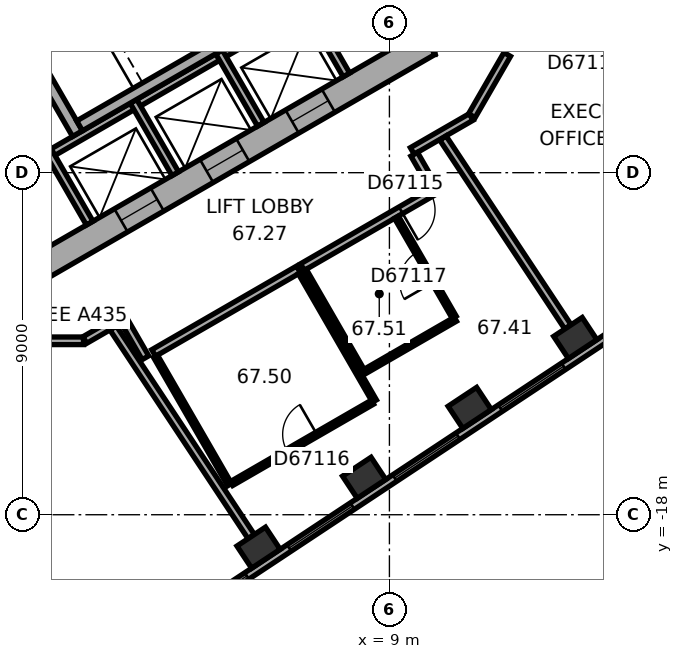
"""IFC4 building model, lengths in metres.
Left out: names, types, materials, properties, quantities, classifications, styles, units other than length and angle.
Written with IfcOpenShell. Run it as: python <this file> out.ifc"""

import sys

from ifc_helpers import new_model, si_unit, direction, frame, frame_2d, origin, origin_2d, place, context, subcontext, project, spatial, rectangle, extrude, element, fill, save


model = new_model("IFC4")
c1 = context("Model", 3, precision=1e-05, world=origin(), true_north=direction((0.0, 1.0)))
c2 = subcontext(c1, "Body", "Model", "MODEL_VIEW")
j1 = project(units=[si_unit("LENGTHUNIT", "METRE"), si_unit("PLANEANGLEUNIT", "RADIAN")], contexts=[c1])
p1 = place(None, origin())
s1 = spatial("IfcSite", under=j1, at=p1, CompositionType="ELEMENT")
p2 = place(p1, origin())
s2 = spatial("IfcBuilding", under=s1, at=p2, CompositionType="ELEMENT")
p3 = place(p2, frame((0.0, 0.0, 270.9)))
s3 = spatial("IfcBuildingStorey", under=s2, at=p3, CompositionType="ELEMENT", Elevation=270.9)
for number, where, z_axis, x_axis in (
    (1, (5.557, -18.867, 0.0), (0.0, 0.0, 1.0), (0.834, 0.552, 0.0)),
    (2, (8.335, -17.028, 0.0), (0.0, 0.0, 1.0), (0.834, 0.552, 0.0)),
    (3, (11.113, -15.189, 0.0), (0.0, 0.0, 1.0), (0.834, 0.552, 0.0)),
    (4, (13.891, -13.351, 0.0), (0.0, 0.0, 1.0), (0.834, 0.552, 0.0)),
):
    element("IfcColumn", number, at=place(p3, frame(where, z_axis=z_axis, x_axis=x_axis)), inside=s3, PredefinedType="COLUMN", context=c2, shape_type="SweptSolid", body=[
        extrude(rectangle(XDim=0.9, YDim=0.7, at=origin_2d()), origin(), (0.0, 0.0, 1.0), 3.7),
    ])
p4 = place(p3, frame((9.85, -5.889, 0.0), z_axis=(0.0, 0.0, 1.0), x_axis=(0.0, 1.0, 0.0)))
e5 = element("IfcWall", 5, at=p4, inside=s3, PredefinedType="SHEAR", context=c2, shape_type="SweptSolid", body=[
    extrude(rectangle(XDim=11.778, YDim=0.7, at=frame_2d((5.889, 0.0))), origin(), (0.0, 0.0, 1.0), 3.7),
])
p5 = place(p4, frame((6.089, 0.0, 0.0)))
e6 = element("IfcOpeningElement", 6, at=p5, cuts=e5, PredefinedType="OPENING", context=c2, shape_type="SweptSolid", body=[
    extrude(rectangle(XDim=1.5, YDim=2.1, at=frame_2d((0.75, 1.05))), frame((0.0, 0.36, 0.0), z_axis=(0.0, -1.0, 0.0), x_axis=(1.0, 0.0, 0.0)), (0.0, 0.0, 1.0), 0.72),
])
p6 = place(p4, frame((1.639, 0.0, 0.0)))
e7 = element("IfcOpeningElement", 7, at=p6, cuts=e5, PredefinedType="OPENING", context=c2, shape_type="SweptSolid", body=[
    extrude(rectangle(XDim=0.9, YDim=2.1, at=frame_2d((0.45, 1.05))), frame((0.0, 0.36, 0.0), z_axis=(0.0, -1.0, 0.0), x_axis=(1.0, 0.0, 0.0)), (0.0, 0.0, 1.0), 0.72),
])
p7 = place(p4, frame((4.239, 0.0, 0.0)))
e8 = element("IfcOpeningElement", 8, at=p7, cuts=e5, PredefinedType="OPENING", context=c2, shape_type="SweptSolid", body=[
    extrude(rectangle(XDim=0.9, YDim=2.1, at=frame_2d((0.45, 1.05))), frame((0.0, 0.36, 0.0), z_axis=(0.0, -1.0, 0.0), x_axis=(1.0, 0.0, 0.0)), (0.0, 0.0, 1.0), 0.72),
])
p8 = place(p3, frame((-10.025, -5.586, 0.0), z_axis=(0.0, 0.0, 1.0), x_axis=(0.866026453023, -0.499998182661, 0.0)))
e9 = element("IfcWall", 9, at=p8, inside=s3, PredefinedType="SHEAR", context=c2, shape_type="SweptSolid", body=[
    extrude(rectangle(XDim=11.778, YDim=0.7, at=frame_2d((5.889, 0.0))), origin(), (0.0, 0.0, 1.0), 3.7),
])
p9 = place(p8, frame((6.089, 0.0, 0.0)))
e10 = element("IfcOpeningElement", 10, at=p9, cuts=e9, PredefinedType="OPENING", context=c2, shape_type="SweptSolid", body=[
    extrude(rectangle(XDim=1.5, YDim=2.1, at=frame_2d((0.75, 1.05))), frame((0.0, 0.36, 0.0), z_axis=(0.0, -1.0, 0.0), x_axis=(1.0, 0.0, 0.0)), (0.0, 0.0, 1.0), 0.72),
])
p10 = place(p8, frame((1.539, 0.0, 0.0)))
e11 = element("IfcOpeningElement", 11, at=p10, cuts=e9, PredefinedType="OPENING", context=c2, shape_type="SweptSolid", body=[
    extrude(rectangle(XDim=1.1, YDim=2.1, at=frame_2d((0.55, 1.05))), frame((0.0, 0.36, 0.0), z_axis=(0.0, -1.0, 0.0), x_axis=(1.0, 0.0, 0.0)), (0.0, 0.0, 1.0), 0.72),
])
p11 = place(p8, frame((4.139, 0.0, 0.0)))
e12 = element("IfcOpeningElement", 12, at=p11, cuts=e9, PredefinedType="OPENING", context=c2, shape_type="SweptSolid", body=[
    extrude(rectangle(XDim=1.1, YDim=2.1, at=frame_2d((0.55, 1.05))), frame((0.0, 0.36, 0.0), z_axis=(0.0, -1.0, 0.0), x_axis=(1.0, 0.0, 0.0)), (0.0, 0.0, 1.0), 0.72),
])
p12 = place(p3, frame((-0.175, -11.475, 0.0), z_axis=(0.0, 0.0, 1.0), x_axis=(0.866026453023, 0.499998182661, 0.0)))
e13 = element("IfcWall", 13, at=p12, inside=s3, PredefinedType="SHEAR", context=c2, shape_type="SweptSolid", body=[
    extrude(rectangle(XDim=11.778, YDim=0.7, at=frame_2d((5.889, 0.0))), origin(), (0.0, 0.0, 1.0), 3.7),
])
p13 = place(p12, frame((2.439, 0.0, 0.0)))
e14 = element("IfcOpeningElement", 14, at=p13, cuts=e13, PredefinedType="OPENING", context=c2, shape_type="SweptSolid", body=[
    extrude(rectangle(XDim=1.1, YDim=2.1, at=frame_2d((0.55, 1.05))), frame((0.0, 0.36, 0.0), z_axis=(0.0, -1.0, 0.0), x_axis=(1.0, 0.0, 0.0)), (0.0, 0.0, 1.0), 0.72),
])
p14 = place(p12, frame((5.039, 0.0, 0.0)))
e15 = element("IfcOpeningElement", 15, at=p14, cuts=e13, PredefinedType="OPENING", context=c2, shape_type="SweptSolid", body=[
    extrude(rectangle(XDim=1.1, YDim=2.1, at=frame_2d((0.55, 1.05))), frame((0.0, 0.36, 0.0), z_axis=(0.0, -1.0, 0.0), x_axis=(1.0, 0.0, 0.0)), (0.0, 0.0, 1.0), 0.72),
])
p15 = place(p12, frame((7.639, 0.0, 0.0)))
e16 = element("IfcOpeningElement", 16, at=p15, cuts=e13, PredefinedType="OPENING", context=c2, shape_type="SweptSolid", body=[
    extrude(rectangle(XDim=1.1, YDim=2.1, at=frame_2d((0.55, 1.05))), frame((0.0, 0.36, 0.0), z_axis=(0.0, -1.0, 0.0), x_axis=(1.0, 0.0, 0.0)), (0.0, 0.0, 1.0), 0.72),
])
p16 = place(p3, frame((2.58, -21.377, 0.0), z_axis=(0.0, 0.0, 1.0), x_axis=(0.833888592176, 0.551932800112, 0.0)))
e17 = element("IfcWall", 17, at=p16, inside=s3, PredefinedType="STANDARD", context=c2, shape_type="SweptSolid", body=[
    extrude(rectangle(XDim=17.731, YDim=0.2, at=frame_2d((8.866, 0.0))), origin(), (0.0, 0.0, 1.0), 3.7),
])
p17 = place(p16, frame((1.202, 0.0, 0.9)))
e18 = element("IfcOpeningElement", 18, at=p17, cuts=e17, PredefinedType="OPENING", context=c2, shape_type="SweptSolid", body=[
    extrude(rectangle(XDim=2.0, YDim=2.0, at=frame_2d((1.0, 1.0))), frame((0.0, 0.11, 0.0), z_axis=(0.0, -1.0, 0.0), x_axis=(1.0, 0.0, 0.0)), (0.0, 0.0, 1.0), 0.22),
])
p18 = place(p16, frame((4.533, 0.0, 0.9)))
e19 = element("IfcOpeningElement", 19, at=p18, cuts=e17, PredefinedType="OPENING", context=c2, shape_type="SweptSolid", body=[
    extrude(rectangle(XDim=2.0, YDim=2.0, at=frame_2d((1.0, 1.0))), frame((0.0, 0.11, 0.0), z_axis=(0.0, -1.0, 0.0), x_axis=(1.0, 0.0, 0.0)), (0.0, 0.0, 1.0), 0.22),
])
p19 = place(p16, frame((7.865, 0.0, 0.9)))
e20 = element("IfcOpeningElement", 20, at=p19, cuts=e17, PredefinedType="OPENING", context=c2, shape_type="SweptSolid", body=[
    extrude(rectangle(XDim=2.0, YDim=2.0, at=frame_2d((1.0, 1.0))), frame((0.0, 0.11, 0.0), z_axis=(0.0, -1.0, 0.0), x_axis=(1.0, 0.0, 0.0)), (0.0, 0.0, 1.0), 0.22),
])
p20 = place(p16, frame((11.197, 0.0, 0.9)))
e21 = element("IfcOpeningElement", 21, at=p20, cuts=e17, PredefinedType="OPENING", context=c2, shape_type="SweptSolid", body=[
    extrude(rectangle(XDim=2.0, YDim=2.0, at=frame_2d((1.0, 1.0))), frame((0.0, 0.11, 0.0), z_axis=(0.0, -1.0, 0.0), x_axis=(1.0, 0.0, 0.0)), (0.0, 0.0, 1.0), 0.22),
])
p21 = place(p16, frame((14.528, 0.0, 0.9)))
e22 = element("IfcOpeningElement", 22, at=p21, cuts=e17, PredefinedType="OPENING", context=c2, shape_type="SweptSolid", body=[
    extrude(rectangle(XDim=2.0, YDim=2.0, at=frame_2d((1.0, 1.0))), frame((0.0, 0.11, 0.0), z_axis=(0.0, -1.0, 0.0), x_axis=(1.0, 0.0, 0.0)), (0.0, 0.0, 1.0), 0.22),
])
p22 = place(p3, frame((-0.024, -8.559, 0.0), z_axis=(0.0, 0.0, 1.0), x_axis=(0.866026010844, 0.49999894854, 0.0)))
e23 = element("IfcWall", 23, at=p22, inside=s3, PredefinedType="PARTITIONING", context=c2, shape_type="SweptSolid", body=[
    extrude(rectangle(XDim=8.0, YDim=0.2, at=frame_2d((4.0, 0.0))), origin(), (0.0, 0.0, 1.0), 3.42),
])
for number, where, z_axis, x_axis in (
    (24, (0.013, -8.422, 0.0), (0.0, 0.0, 1.0), (0.5, -0.866, 0.0)),
    (25, (2.264, -7.122, 0.0), (0.0, 0.0, 1.0), (0.5, -0.866, 0.0)),
    (26, (4.516, -5.822, 0.0), (0.0, 0.0, 1.0), (0.5, -0.866, 0.0)),
    (27, (6.768, -4.522, 0.0), (0.0, 0.0, 1.0), (0.5, -0.866, 0.0)),
):
    element("IfcWall", number, at=place(p3, frame(where, z_axis=z_axis, x_axis=x_axis)), inside=s3, PredefinedType="PARTITIONING", context=c2, shape_type="SweptSolid", body=[
        extrude(rectangle(XDim=2.2, YDim=0.2, at=frame_2d((1.1, 0.0))), origin(), (0.0, 0.0, 1.0), 3.42),
    ])
p23 = place(p3, frame((-1.558, -3.902, 0.0), z_axis=(0.0, 0.0, 1.0), x_axis=(0.499977259774, -0.866038532462, 0.0)))
e28 = element("IfcWall", 28, at=p23, inside=s3, PredefinedType="SHEAR", context=c2, shape_type="SweptSolid", body=[
    extrude(rectangle(XDim=4.7, YDim=0.3, at=frame_2d((2.35, 0.0))), origin(), (0.0, 0.0, 1.0), 3.42),
])
p24 = place(p23, frame((0.8, 0.0, 0.0)))
e29 = element("IfcOpeningElement", 29, at=p24, cuts=e28, PredefinedType="OPENING", context=c2, shape_type="SweptSolid", body=[
    extrude(rectangle(XDim=1.2, YDim=2.1, at=frame_2d((0.6, 1.05))), frame((0.0, 0.16, 0.0), z_axis=(0.0, -1.0, 0.0), x_axis=(1.0, 0.0, 0.0)), (0.0, 0.0, 1.0), 0.32),
])
p25 = place(p3, frame((0.847, -7.767, 0.0), z_axis=(0.0, 0.0, 1.0), x_axis=(0.866027801685, 0.499995846692, 0.0)))
e30 = element("IfcWall", 30, at=p25, inside=s3, PredefinedType="SHEAR", context=c2, shape_type="SweptSolid", body=[
    extrude(rectangle(XDim=7.06, YDim=0.3, at=frame_2d((3.53, 0.0))), origin(), (0.0, 0.0, 1.0), 3.42),
])
p26 = place(p3, frame((-0.91, -13.423, 0.0), z_axis=(0.0, 0.0, 1.0), x_axis=(1.0, 0.0, 0.0)))
e31 = element("IfcWall", 31, at=p26, inside=s3, PredefinedType="PARTITIONING", context=c2, shape_type="SweptSolid", body=[
    extrude(rectangle(XDim=1.86, YDim=0.2, at=frame_2d((0.93, 0.0))), origin(), (0.0, 0.0, 1.0), 3.42),
])
p27 = place(p3, frame((0.985, -13.403, 0.0), z_axis=(0.0, 0.0, 1.0), x_axis=(0.866032814021, 0.499987164874, 0.0)))
e32 = element("IfcWall", 32, at=p27, inside=s3, PredefinedType="PARTITIONING", context=c2, shape_type="SweptSolid", body=[
    extrude(rectangle(XDim=0.798, YDim=0.2, at=frame_2d((0.399, 0.0))), origin(), (0.0, 0.0, 1.0), 3.42),
])
p28 = place(p3, frame((1.979, -12.829, 0.0), z_axis=(0.0, 0.0, 1.0), x_axis=(0.500074377092, -0.865982457891, 0.0)))
e33 = element("IfcWall", 33, at=p28, inside=s3, PredefinedType="PARTITIONING", context=c2, shape_type="SweptSolid", body=[
    extrude(rectangle(XDim=1.201, YDim=0.2, at=frame_2d((0.601, 0.0))), origin(), (0.0, 0.0, 1.0), 3.42),
])
p29 = place(p3, frame((2.796, -13.744, 0.0), z_axis=(0.0, 0.0, 1.0), x_axis=(0.866018331238, 0.50001224981, 0.0)))
e34 = element("IfcWall", 34, at=p29, inside=s3, PredefinedType="PARTITIONING", context=c2, shape_type="SweptSolid", body=[
    extrude(rectangle(XDim=4.4, YDim=0.2, at=frame_2d((2.2, 0.0))), origin(), (0.0, 0.0, 1.0), 3.42),
])
p30 = place(p3, frame((4.796, -17.208, 0.0), z_axis=(0.0, 0.0, 1.0), x_axis=(-0.500043961785, 0.866000020948, 0.0)))
e35 = element("IfcWall", 35, at=p30, inside=s3, PredefinedType="PARTITIONING", context=c2, shape_type="SweptSolid", body=[
    extrude(rectangle(XDim=3.9, YDim=0.12, at=frame_2d((1.95, 0.0))), origin(), (0.0, 0.0, 1.0), 3.42),
])
p31 = place(p3, frame((5.364, -18.575, 0.0), z_axis=(0.0, 0.0, 1.0), x_axis=(-0.55195757761, 0.833872191957, 0.0)))
e36 = element("IfcWall", 36, at=p31, inside=s3, PredefinedType="PARTITIONING", context=c2, shape_type="SweptSolid", body=[
    extrude(rectangle(XDim=6.581, YDim=0.2, at=frame_2d((3.291, 0.0))), origin(), (0.0, 0.0, 1.0), 3.42),
])
p32 = place(p3, frame((6.656, -11.631, 0.0), z_axis=(0.0, 0.0, 1.0), x_axis=(0.499997012787, -0.866027128446, 0.0)))
e37 = element("IfcWall", 37, at=p32, inside=s3, PredefinedType="PARTITIONING", context=c2, shape_type="SweptSolid", body=[
    extrude(rectangle(XDim=3.9, YDim=0.12, at=frame_2d((1.95, 0.0))), origin(), (0.0, 0.0, 1.0), 3.42),
])
p33 = place(p3, frame((6.71, -11.485, 0.0), z_axis=(0.0, 0.0, 1.0), x_axis=(0.866021232452, 0.500007224889, 0.0)))
e38 = element("IfcWall", 38, at=p33, inside=s3, PredefinedType="PARTITIONING", context=c2, shape_type="SweptSolid", body=[
    extrude(rectangle(XDim=4.032, YDim=0.2, at=frame_2d((2.016, 0.0))), origin(), (0.0, 0.0, 1.0), 3.42),
])
p34 = place(p33, frame((2.991, 0.0, 0.0)))
e39 = element("IfcOpeningElement", 39, at=p34, cuts=e38, PredefinedType="OPENING", context=c2, shape_type="SweptSolid", body=[
    extrude(rectangle(XDim=0.9, YDim=2.1, at=frame_2d((0.45, 1.05))), frame((0.0, 0.11, 0.0), z_axis=(0.0, -1.0, 0.0), x_axis=(1.0, 0.0, 0.0)), (0.0, 0.0, 1.0), 0.22),
])
p35 = place(p3, frame((8.31, -14.256, 0.0), z_axis=(0.0, 0.0, 1.0), x_axis=(-0.49999285859, 0.86602952684, 0.0)))
e40 = element("IfcWall", 40, at=p35, inside=s3, PredefinedType="PARTITIONING", context=c2, shape_type="SweptSolid", body=[
    extrude(rectangle(XDim=3.1, YDim=0.12, at=frame_2d((1.55, 0.0))), origin(), (0.0, 0.0, 1.0), 3.42),
])
p36 = place(p3, frame((8.554, -15.039, 0.0), z_axis=(0.0, 0.0, 1.0), x_axis=(-0.865994635417, -0.500053288589, 0.0)))
e41 = element("IfcWall", 41, at=p36, inside=s3, PredefinedType="PARTITIONING", context=c2, shape_type="SweptSolid", body=[
    extrude(rectangle(XDim=4.28, YDim=0.12, at=frame_2d((2.14, 0.0))), origin(), (0.0, 0.0, 1.0), 3.42),
])
p37 = place(p36, frame((1.69, 0.0, 0.0)))
e42 = element("IfcOpeningElement", 42, at=p37, cuts=e41, PredefinedType="OPENING", context=c2, shape_type="SweptSolid", body=[
    extrude(rectangle(XDim=0.9, YDim=2.1, at=frame_2d((0.45, 1.05))), frame((0.0, 0.07, 0.0), z_axis=(0.0, -1.0, 0.0), x_axis=(1.0, 0.0, 0.0)), (0.0, 0.0, 1.0), 0.14),
])
p38 = place(p3, frame((9.602, -8.428, 0.0), z_axis=(0.0, 0.0, 1.0), x_axis=(0.865999114786, 0.500045531117, 0.0)))
e43 = element("IfcWall", 43, at=p38, inside=s3, PredefinedType="PARTITIONING", context=c2, shape_type="SweptSolid", body=[
    extrude(rectangle(XDim=1.788, YDim=0.2, at=frame_2d((0.894, 0.0))), origin(), (0.0, 0.0, 1.0), 3.42),
])
p39 = place(p3, frame((10.152, -9.382, 0.0), z_axis=(0.0, 0.0, 1.0), x_axis=(-0.499968756647, 0.866043441391, 0.0)))
e44 = element("IfcWall", 44, at=p39, inside=s3, PredefinedType="PARTITIONING", context=c2, shape_type="SweptSolid", body=[
    extrude(rectangle(XDim=1.001, YDim=0.2, at=frame_2d((0.5, 0.0))), origin(), (0.0, 0.0, 1.0), 3.42),
])
p40 = place(p3, frame((10.705, -12.804, 0.0), z_axis=(0.0, 0.0, 1.0), x_axis=(-0.500026023896, 0.86601037836, 0.0)))
e45 = element("IfcWall", 45, at=p40, inside=s3, PredefinedType="PARTITIONING", context=c2, shape_type="SweptSolid", body=[
    extrude(rectangle(XDim=3.04, YDim=0.12, at=frame_2d((1.52, 0.0))), origin(), (0.0, 0.0, 1.0), 3.42),
])
p41 = place(p40, frame((1.07, 0.0, 0.0)))
e46 = element("IfcOpeningElement", 46, at=p41, cuts=e45, PredefinedType="OPENING", context=c2, shape_type="SweptSolid", body=[
    extrude(rectangle(XDim=0.9, YDim=2.1, at=frame_2d((0.45, 1.05))), frame((0.0, 0.07, 0.0), z_axis=(0.0, -1.0, 0.0), x_axis=(1.0, 0.0, 0.0)), (0.0, 0.0, 1.0), 0.14),
])
p42 = place(p3, frame((10.735, -12.856, 0.0), z_axis=(0.0, 0.0, 1.0), x_axis=(-0.865997131366, -0.500048966069, 0.0)))
e47 = element("IfcWall", 47, at=p42, inside=s3, PredefinedType="PARTITIONING", context=c2, shape_type="SweptSolid", body=[
    extrude(rectangle(XDim=2.74, YDim=0.12, at=frame_2d((1.37, 0.0))), origin(), (0.0, 0.0, 1.0), 3.42),
])
p43 = place(p3, frame((11.17, -7.5, 0.0), z_axis=(0.0, 0.0, 1.0), x_axis=(0.500006454166, 0.866021677438, 0.0)))
e48 = element("IfcWall", 48, at=p43, inside=s3, PredefinedType="PARTITIONING", context=c2, shape_type="SweptSolid", body=[
    extrude(rectangle(XDim=1.86, YDim=0.2, at=frame_2d((0.93, 0.0))), origin(), (0.0, 0.0, 1.0), 3.42),
])
p44 = place(p3, frame((13.698, -13.059, 0.0), z_axis=(0.0, 0.0, 1.0), x_axis=(-0.551927229301, 0.833892279348, 0.0)))
e49 = element("IfcWall", 49, at=p44, inside=s3, PredefinedType="PARTITIONING", context=c2, shape_type="SweptSolid", body=[
    extrude(rectangle(XDim=5.96, YDim=0.2, at=frame_2d((2.98, 0.0))), origin(), (0.0, 0.0, 1.0), 2.87),
])
p45 = place(p17, origin())
e50 = element("IfcWindow", 50, at=p45, inside=s3, PartitioningType="SINGLE_PANEL", PredefinedType="WINDOW", context=c2, shape_type="SweptSolid", body=[
    extrude(rectangle(XDim=2.0, YDim=2.0, at=frame_2d((1.0, 1.0))), frame((0.0, 0.03, 0.0), z_axis=(0.0, -1.0, 0.0), x_axis=(1.0, 0.0, 0.0)), (0.0, 0.0, 1.0), 0.06),
])
fill(e18, e50)
p46 = place(p18, origin())
e51 = element("IfcWindow", 51, at=p46, inside=s3, PartitioningType="SINGLE_PANEL", PredefinedType="WINDOW", context=c2, shape_type="SweptSolid", body=[
    extrude(rectangle(XDim=2.0, YDim=2.0, at=frame_2d((1.0, 1.0))), frame((0.0, 0.03, 0.0), z_axis=(0.0, -1.0, 0.0), x_axis=(1.0, 0.0, 0.0)), (0.0, 0.0, 1.0), 0.06),
])
fill(e19, e51)
p47 = place(p19, origin())
e52 = element("IfcWindow", 52, at=p47, inside=s3, PartitioningType="SINGLE_PANEL", PredefinedType="WINDOW", context=c2, shape_type="SweptSolid", body=[
    extrude(rectangle(XDim=2.0, YDim=2.0, at=frame_2d((1.0, 1.0))), frame((0.0, 0.03, 0.0), z_axis=(0.0, -1.0, 0.0), x_axis=(1.0, 0.0, 0.0)), (0.0, 0.0, 1.0), 0.06),
])
fill(e20, e52)
p48 = place(p20, origin())
e53 = element("IfcWindow", 53, at=p48, inside=s3, PartitioningType="SINGLE_PANEL", PredefinedType="WINDOW", context=c2, shape_type="SweptSolid", body=[
    extrude(rectangle(XDim=2.0, YDim=2.0, at=frame_2d((1.0, 1.0))), frame((0.0, 0.03, 0.0), z_axis=(0.0, -1.0, 0.0), x_axis=(1.0, 0.0, 0.0)), (0.0, 0.0, 1.0), 0.06),
])
fill(e21, e53)
p49 = place(p13, origin())
e54 = element("IfcDoor", 54, at=p49, inside=s3, OperationType="DOUBLE_DOOR_SLIDING", PredefinedType="DOOR", context=c2, shape_type="SweptSolid", body=[
    extrude(rectangle(XDim=1.1, YDim=2.1, at=frame_2d((0.55, 1.05))), frame((0.0, 0.025, 0.0), z_axis=(0.0, -1.0, 0.0), x_axis=(1.0, 0.0, 0.0)), (0.0, 0.0, 1.0), 0.05),
])
fill(e14, e54)
p50 = place(p14, origin())
e55 = element("IfcDoor", 55, at=p50, inside=s3, OperationType="DOUBLE_DOOR_SLIDING", PredefinedType="DOOR", context=c2, shape_type="SweptSolid", body=[
    extrude(rectangle(XDim=1.1, YDim=2.1, at=frame_2d((0.55, 1.05))), frame((0.0, 0.025, 0.0), z_axis=(0.0, -1.0, 0.0), x_axis=(1.0, 0.0, 0.0)), (0.0, 0.0, 1.0), 0.05),
])
fill(e15, e55)
p51 = place(p15, origin())
e56 = element("IfcDoor", 56, at=p51, inside=s3, OperationType="DOUBLE_DOOR_SLIDING", PredefinedType="DOOR", context=c2, shape_type="SweptSolid", body=[
    extrude(rectangle(XDim=1.1, YDim=2.1, at=frame_2d((0.55, 1.05))), frame((0.0, 0.025, 0.0), z_axis=(0.0, -1.0, 0.0), x_axis=(1.0, 0.0, 0.0)), (0.0, 0.0, 1.0), 0.05),
])
fill(e16, e56)
p52 = place(p34, origin())
e57 = element("IfcDoor", 57, at=p52, inside=s3, OperationType="SINGLE_SWING_LEFT", PredefinedType="DOOR", context=c2, shape_type="SweptSolid", body=[
    extrude(rectangle(XDim=0.9, YDim=2.1, at=frame_2d((0.45, 1.05))), frame((0.0, 0.025, 0.0), z_axis=(0.0, -1.0, 0.0), x_axis=(1.0, 0.0, 0.0)), (0.0, 0.0, 1.0), 0.05),
])
fill(e39, e57)
p53 = place(p37, origin())
e58 = element("IfcDoor", 58, at=p53, inside=s3, OperationType="SINGLE_SWING_LEFT", PredefinedType="DOOR", context=c2, shape_type="SweptSolid", body=[
    extrude(rectangle(XDim=0.9, YDim=2.1, at=frame_2d((0.45, 1.05))), frame((0.0, 0.025, 0.0), z_axis=(0.0, -1.0, 0.0), x_axis=(1.0, 0.0, 0.0)), (0.0, 0.0, 1.0), 0.05),
])
fill(e42, e58)
p54 = place(p41, origin())
e59 = element("IfcDoor", 59, at=p54, inside=s3, OperationType="SINGLE_SWING_LEFT", PredefinedType="DOOR", context=c2, shape_type="SweptSolid", body=[
    extrude(rectangle(XDim=0.9, YDim=2.1, at=frame_2d((0.45, 1.05))), frame((0.0, 0.025, 0.0), z_axis=(0.0, -1.0, 0.0), x_axis=(1.0, 0.0, 0.0)), (0.0, 0.0, 1.0), 0.05),
])
fill(e46, e59)
save(model, sys.argv[1])
